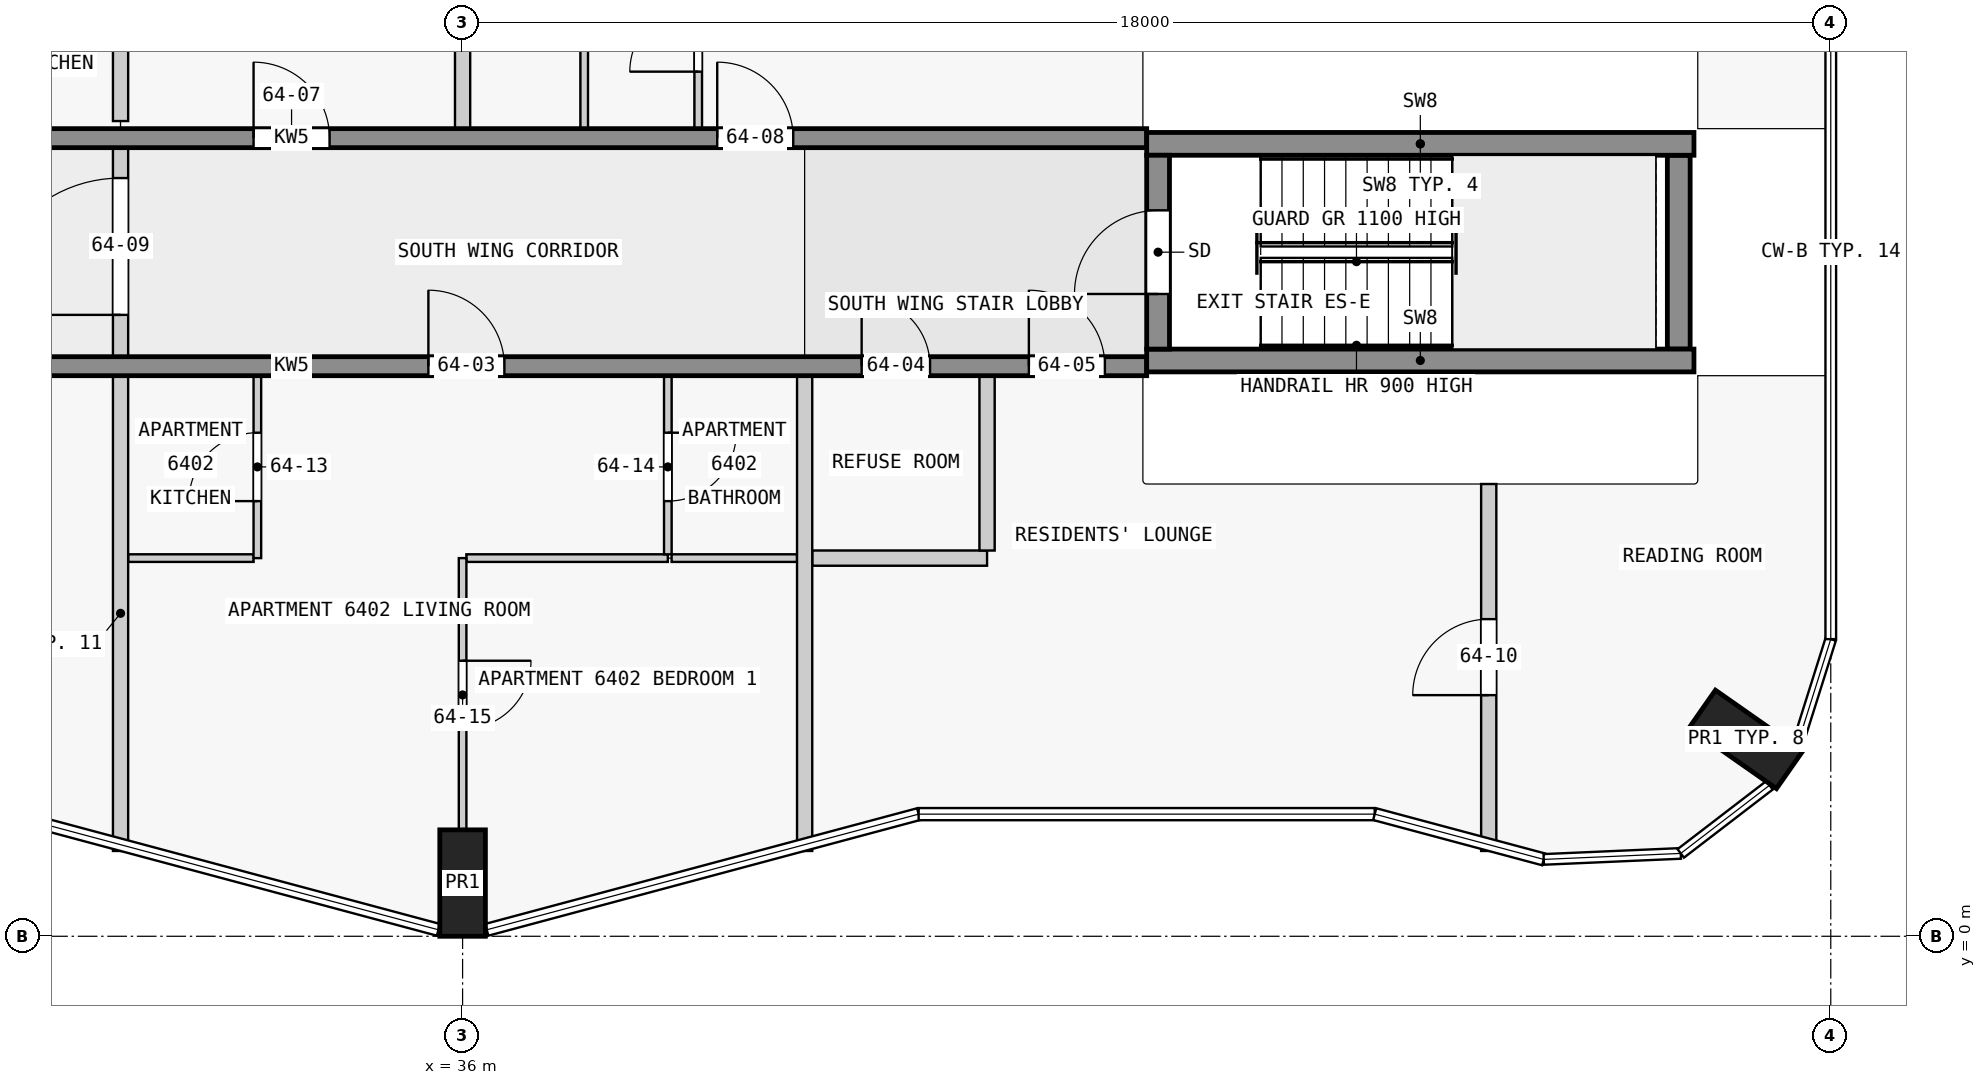
"""IFC4 building model, lengths in metres.
Left out: names, types, materials, properties, quantities, classifications, styles, units other than length and angle.
Written with IfcOpenShell. Run it as: python <this file> out.ifc"""

import sys

from ifc_helpers import new_model, si_unit, direction, frame, frame_2d, origin, origin_2d, place, context, subcontext, project, spatial, rectangle, extrude, element, fill, save


model = new_model("IFC4")
c1 = context("Model", 3, precision=1e-05, world=origin(), true_north=direction((0.0, 1.0)))
c2 = subcontext(c1, "Body", "Model", "MODEL_VIEW")
j1 = project(units=[si_unit("LENGTHUNIT", "METRE"), si_unit("PLANEANGLEUNIT", "RADIAN")], contexts=[c1])
p1 = place(None, origin())
s1 = spatial("IfcSite", under=j1, at=p1, CompositionType="ELEMENT")
p2 = place(p1, origin())
s2 = spatial("IfcBuilding", under=s1, at=p2, CompositionType="ELEMENT")
p3 = place(p2, frame((0.0, 0.0, 245.9)))
s3 = spatial("IfcBuildingStorey", under=s2, at=p3, CompositionType="ELEMENT", Elevation=245.9)
for number, where, z_axis, x_axis in (
    (1, (36.0, 0.7, 0.0), (0.0, 0.0, 1.0), (1.0, 0.0, 0.0)),
    (2, (52.884, 2.59, 0.0), (0.0, 0.0, 1.0), (0.574, 0.819, 0.0)),
):
    element("IfcColumn", number, at=place(p3, frame(where, z_axis=z_axis, x_axis=x_axis)), inside=s3, PredefinedType="COLUMN", context=c2, shape_type="SweptSolid", body=[
        extrude(rectangle(XDim=0.6, YDim=1.4, at=origin_2d()), origin(), (0.0, 0.0, 1.0), 3.5),
    ])
p4 = place(p3, frame((45.15, 7.725, 0.0), z_axis=(0.0, 0.0, 1.0), x_axis=(0.0, 1.0, 0.0)))
e3 = element("IfcWall", 3, at=p4, inside=s3, PredefinedType="SHEAR", context=c2, shape_type="SweptSolid", body=[
    extrude(rectangle(XDim=2.55, YDim=0.3, at=frame_2d((1.275, 0.0))), origin(), (0.0, 0.0, 1.0), 3.5),
])
p5 = place(p4, frame((0.725, 0.0, 0.0)))
e4 = element("IfcOpeningElement", 4, at=p5, cuts=e3, PredefinedType="OPENING", context=c2, shape_type="SweptSolid", body=[
    extrude(rectangle(XDim=1.1, YDim=2.1, at=frame_2d((0.55, 1.05))), frame((0.0, 0.16, 0.0), z_axis=(0.0, -1.0, 0.0), x_axis=(1.0, 0.0, 0.0)), (0.0, 0.0, 1.0), 0.32),
])
p6 = place(p3, frame((52.0, 7.725, 0.0), z_axis=(0.0, 0.0, 1.0), x_axis=(0.0, 1.0, 0.0)))
e5 = element("IfcWall", 5, at=p6, inside=s3, PredefinedType="SHEAR", context=c2, shape_type="SweptSolid", body=[
    extrude(rectangle(XDim=2.55, YDim=0.3, at=frame_2d((1.275, 0.0))), origin(), (0.0, 0.0, 1.0), 3.5),
])
for number, where, z_axis, x_axis in (
    (6, (45.0, 7.575, 0.0), (0.0, 0.0, 1.0), (1.0, 0.0, 0.0)),
    (7, (45.0, 10.425, 0.0), (0.0, 0.0, 1.0), (1.0, 0.0, 0.0)),
):
    element("IfcWall", number, at=place(p3, frame(where, z_axis=z_axis, x_axis=x_axis)), inside=s3, PredefinedType="SHEAR", context=c2, shape_type="SweptSolid", body=[
        extrude(rectangle(XDim=7.2, YDim=0.3, at=frame_2d((3.6, 0.0))), origin(), (0.0, 0.0, 1.0), 3.5),
    ])
p7 = place(p3, frame((22.5, 7.5, 0.0), z_axis=(0.0, 0.0, 1.0), x_axis=(1.0, 0.0, 0.0)))
e8 = element("IfcWall", 8, at=p7, inside=s3, PredefinedType="SHEAR", context=c2, shape_type="SweptSolid", body=[
    extrude(rectangle(XDim=22.5, YDim=0.25, at=frame_2d((11.25, 0.0))), origin(), (0.0, 0.0, 1.0), 3.25),
])
p8 = place(p7, frame((1.75, 0.0, 0.0)))
e9 = element("IfcOpeningElement", 9, at=p8, cuts=e8, PredefinedType="OPENING", context=c2, shape_type="SweptSolid", body=[
    extrude(rectangle(XDim=1.0, YDim=2.1, at=frame_2d((0.5, 1.05))), frame((0.0, 0.135, 0.0), z_axis=(0.0, -1.0, 0.0), x_axis=(1.0, 0.0, 0.0)), (0.0, 0.0, 1.0), 0.27),
])
p9 = place(p7, frame((5.85, 0.0, 0.0)))
e10 = element("IfcOpeningElement", 10, at=p9, cuts=e8, PredefinedType="OPENING", context=c2, shape_type="SweptSolid", body=[
    extrude(rectangle(XDim=1.8, YDim=2.1, at=frame_2d((0.9, 1.05))), frame((0.0, 0.135, 0.0), z_axis=(0.0, -1.0, 0.0), x_axis=(1.0, 0.0, 0.0)), (0.0, 0.0, 1.0), 0.27),
])
p10 = place(p7, frame((13.05, 0.0, 0.0)))
e11 = element("IfcOpeningElement", 11, at=p10, cuts=e8, PredefinedType="OPENING", context=c2, shape_type="SweptSolid", body=[
    extrude(rectangle(XDim=1.0, YDim=2.1, at=frame_2d((0.5, 1.05))), frame((0.0, 0.135, 0.0), z_axis=(0.0, -1.0, 0.0), x_axis=(1.0, 0.0, 0.0)), (0.0, 0.0, 1.0), 0.27),
])
p11 = place(p7, frame((18.75, 0.0, 0.0)))
e12 = element("IfcOpeningElement", 12, at=p11, cuts=e8, PredefinedType="OPENING", context=c2, shape_type="SweptSolid", body=[
    extrude(rectangle(XDim=0.9, YDim=2.1, at=frame_2d((0.45, 1.05))), frame((0.0, 0.135, 0.0), z_axis=(0.0, -1.0, 0.0), x_axis=(1.0, 0.0, 0.0)), (0.0, 0.0, 1.0), 0.27),
])
p12 = place(p7, frame((20.95, 0.0, 0.0)))
e13 = element("IfcOpeningElement", 13, at=p12, cuts=e8, PredefinedType="OPENING", context=c2, shape_type="SweptSolid", body=[
    extrude(rectangle(XDim=1.0, YDim=2.1, at=frame_2d((0.5, 1.05))), frame((0.0, 0.135, 0.0), z_axis=(0.0, -1.0, 0.0), x_axis=(1.0, 0.0, 0.0)), (0.0, 0.0, 1.0), 0.27),
])
p13 = place(p3, frame((22.5, 10.5, 0.0), z_axis=(0.0, 0.0, 1.0), x_axis=(1.0, 0.0, 0.0)))
e14 = element("IfcWall", 14, at=p13, inside=s3, PredefinedType="SHEAR", context=c2, shape_type="SweptSolid", body=[
    extrude(rectangle(XDim=22.5, YDim=0.25, at=frame_2d((11.25, 0.0))), origin(), (0.0, 0.0, 1.0), 3.25),
])
p14 = place(p13, frame((4.05, 0.0, 0.0)))
e15 = element("IfcOpeningElement", 15, at=p14, cuts=e14, PredefinedType="OPENING", context=c2, shape_type="SweptSolid", body=[
    extrude(rectangle(XDim=1.0, YDim=2.1, at=frame_2d((0.5, 1.05))), frame((0.0, 0.135, 0.0), z_axis=(0.0, -1.0, 0.0), x_axis=(1.0, 0.0, 0.0)), (0.0, 0.0, 1.0), 0.27),
])
p15 = place(p13, frame((10.75, 0.0, 0.0)))
e16 = element("IfcOpeningElement", 16, at=p15, cuts=e14, PredefinedType="OPENING", context=c2, shape_type="SweptSolid", body=[
    extrude(rectangle(XDim=1.0, YDim=2.1, at=frame_2d((0.5, 1.05))), frame((0.0, 0.135, 0.0), z_axis=(0.0, -1.0, 0.0), x_axis=(1.0, 0.0, 0.0)), (0.0, 0.0, 1.0), 0.27),
])
p16 = place(p13, frame((16.85, 0.0, 0.0)))
e17 = element("IfcOpeningElement", 17, at=p16, cuts=e14, PredefinedType="OPENING", context=c2, shape_type="SweptSolid", body=[
    extrude(rectangle(XDim=1.0, YDim=2.1, at=frame_2d((0.5, 1.05))), frame((0.0, 0.135, 0.0), z_axis=(0.0, -1.0, 0.0), x_axis=(1.0, 0.0, 0.0)), (0.0, 0.0, 1.0), 0.27),
])
p17 = place(p3, frame((38.7, 4.975, 0.0), z_axis=(0.0, 0.0, 1.0), x_axis=(-1.0, 0.0, 0.0)))
e18 = element("IfcWall", 18, at=p17, inside=s3, PredefinedType="PARTITIONING", context=c2, shape_type="SweptSolid", body=[
    extrude(rectangle(XDim=2.65, YDim=0.1, at=frame_2d((1.325, 0.0))), origin(), (0.0, 0.0, 1.0), 3.25),
])
for number, where, z_axis, x_axis in (
    (19, (31.6, 4.975, 0.0), (0.0, 0.0, 1.0), (1.0, 0.0, 0.0)),
    (20, (38.75, 4.975, 0.0), (0.0, 0.0, 1.0), (1.0, 0.0, 0.0)),
):
    element("IfcWall", number, at=place(p3, frame(where, z_axis=z_axis, x_axis=x_axis)), inside=s3, PredefinedType="PARTITIONING", context=c2, shape_type="SweptSolid", body=[
        extrude(rectangle(XDim=1.65, YDim=0.1, at=frame_2d((0.825, 0.0))), origin(), (0.0, 0.0, 1.0), 3.25),
    ])
p18 = place(p3, frame((40.6, 4.975, 0.0), z_axis=(0.0, 0.0, 1.0), x_axis=(1.0, 0.0, 0.0)))
e21 = element("IfcWall", 21, at=p18, inside=s3, PredefinedType="PARTITIONING", context=c2, shape_type="SweptSolid", body=[
    extrude(rectangle(XDim=2.3, YDim=0.2, at=frame_2d((1.15, 0.0))), origin(), (0.0, 0.0, 1.0), 3.25),
])
p19 = place(p3, frame((31.5, 1.122, 0.0), z_axis=(0.0, 0.0, 1.0), x_axis=(0.0, 1.0, 0.0)))
e22 = element("IfcWall", 22, at=p19, inside=s3, PredefinedType="PARTITIONING", context=c2, shape_type="SweptSolid", body=[
    extrude(rectangle(XDim=6.253, YDim=0.2, at=frame_2d((3.126, 0.0))), origin(), (0.0, 0.0, 1.0), 3.25),
])
p20 = place(p3, frame((31.5, 10.725, 0.0), z_axis=(0.0, 0.0, 1.0), x_axis=(0.0, 1.0, 0.0)))
e23 = element("IfcWall", 23, at=p20, inside=s3, PredefinedType="PARTITIONING", context=c2, shape_type="SweptSolid", body=[
    extrude(rectangle(XDim=2.2, YDim=0.2, at=frame_2d((1.1, 0.0))), origin(), (0.0, 0.0, 1.0), 3.25),
])
p21 = place(p3, frame((33.3, 4.975, 0.0), z_axis=(0.0, 0.0, 1.0), x_axis=(0.0, 1.0, 0.0)))
e24 = element("IfcWall", 24, at=p21, inside=s3, PredefinedType="PARTITIONING", context=c2, shape_type="SweptSolid", body=[
    extrude(rectangle(XDim=2.4, YDim=0.1, at=frame_2d((1.2, 0.0))), origin(), (0.0, 0.0, 1.0), 3.25),
])
p22 = place(p21, frame((0.75, 0.0, 0.0)))
e25 = element("IfcOpeningElement", 25, at=p22, cuts=e24, PredefinedType="OPENING", context=c2, shape_type="SweptSolid", body=[
    extrude(rectangle(XDim=0.9, YDim=2.1, at=frame_2d((0.45, 1.05))), frame((0.0, 0.06, 0.0), z_axis=(0.0, -1.0, 0.0), x_axis=(1.0, 0.0, 0.0)), (0.0, 0.0, 1.0), 0.12),
])
p23 = place(p3, frame((36.0, 4.975, 0.0), z_axis=(0.0, 0.0, 1.0), x_axis=(0.0, -1.0, 0.0)))
e26 = element("IfcWall", 26, at=p23, inside=s3, PredefinedType="PARTITIONING", context=c2, shape_type="SweptSolid", body=[
    extrude(rectangle(XDim=3.575, YDim=0.1, at=frame_2d((1.788, 0.0))), origin(), (0.0, 0.0, 1.0), 3.25),
])
p24 = place(p23, frame((1.35, 0.0, 0.0)))
e27 = element("IfcOpeningElement", 27, at=p24, cuts=e26, PredefinedType="OPENING", context=c2, shape_type="SweptSolid", body=[
    extrude(rectangle(XDim=0.9, YDim=2.1, at=frame_2d((0.45, 1.05))), frame((0.0, 0.06, 0.0), z_axis=(0.0, -1.0, 0.0), x_axis=(1.0, 0.0, 0.0)), (0.0, 0.0, 1.0), 0.12),
])
p25 = place(p3, frame((36.0, 10.625, 0.0), z_axis=(0.0, 0.0, 1.0), x_axis=(0.0, 1.0, 0.0)))
e28 = element("IfcWall", 28, at=p25, inside=s3, PredefinedType="PARTITIONING", context=c2, shape_type="SweptSolid", body=[
    extrude(rectangle(XDim=5.975, YDim=0.2, at=frame_2d((2.988, 0.0))), origin(), (0.0, 0.0, 1.0), 3.25),
])
p26 = place(p3, frame((37.6, 10.625, 0.0), z_axis=(0.0, 0.0, 1.0), x_axis=(0.0, 1.0, 0.0)))
e29 = element("IfcWall", 29, at=p26, inside=s3, PredefinedType="PARTITIONING", context=c2, shape_type="SweptSolid", body=[
    extrude(rectangle(XDim=2.35, YDim=0.1, at=frame_2d((1.175, 0.0))), origin(), (0.0, 0.0, 1.0), 3.25),
])
p27 = place(p3, frame((38.7, 7.375, 0.0), z_axis=(0.0, 0.0, 1.0), x_axis=(0.0, -1.0, 0.0)))
e30 = element("IfcWall", 30, at=p27, inside=s3, PredefinedType="PARTITIONING", context=c2, shape_type="SweptSolid", body=[
    extrude(rectangle(XDim=2.35, YDim=0.1, at=frame_2d((1.175, 0.0))), origin(), (0.0, 0.0, 1.0), 3.25),
])
p28 = place(p27, frame((0.75, 0.0, 0.0)))
e31 = element("IfcOpeningElement", 31, at=p28, cuts=e30, PredefinedType="OPENING", context=c2, shape_type="SweptSolid", body=[
    extrude(rectangle(XDim=0.9, YDim=2.1, at=frame_2d((0.45, 1.05))), frame((0.0, 0.06, 0.0), z_axis=(0.0, -1.0, 0.0), x_axis=(1.0, 0.0, 0.0)), (0.0, 0.0, 1.0), 0.12),
])
p29 = place(p3, frame((39.1, 10.625, 0.0), z_axis=(0.0, 0.0, 1.0), x_axis=(0.0, 1.0, 0.0)))
e32 = element("IfcWall", 32, at=p29, inside=s3, PredefinedType="PARTITIONING", context=c2, shape_type="SweptSolid", body=[
    extrude(rectangle(XDim=2.35, YDim=0.1, at=frame_2d((1.175, 0.0))), origin(), (0.0, 0.0, 1.0), 3.25),
])
p30 = place(p29, frame((0.75, 0.0, 0.0)))
e33 = element("IfcOpeningElement", 33, at=p30, cuts=e32, PredefinedType="OPENING", context=c2, shape_type="SweptSolid", body=[
    extrude(rectangle(XDim=0.9, YDim=2.1, at=frame_2d((0.45, 1.05))), frame((0.0, 0.06, 0.0), z_axis=(0.0, -1.0, 0.0), x_axis=(1.0, 0.0, 0.0)), (0.0, 0.0, 1.0), 0.12),
])
p31 = place(p3, frame((40.5, 1.122, 0.0), z_axis=(0.0, 0.0, 1.0), x_axis=(0.0, 1.0, 0.0)))
e34 = element("IfcWall", 34, at=p31, inside=s3, PredefinedType="PARTITIONING", context=c2, shape_type="SweptSolid", body=[
    extrude(rectangle(XDim=6.253, YDim=0.2, at=frame_2d((3.126, 0.0))), origin(), (0.0, 0.0, 1.0), 3.25),
])
p32 = place(p3, frame((42.9, 5.075, 0.0), z_axis=(0.0, 0.0, 1.0), x_axis=(0.0, 1.0, 0.0)))
e35 = element("IfcWall", 35, at=p32, inside=s3, PredefinedType="PARTITIONING", context=c2, shape_type="SweptSolid", body=[
    extrude(rectangle(XDim=2.3, YDim=0.2, at=frame_2d((1.15, 0.0))), origin(), (0.0, 0.0, 1.0), 3.25),
])
p33 = place(p3, frame((49.5, 1.122, 0.0), z_axis=(0.0, 0.0, 1.0), x_axis=(0.0, 1.0, 0.0)))
e36 = element("IfcWall", 36, at=p33, inside=s3, PredefinedType="PARTITIONING", context=c2, shape_type="SweptSolid", body=[
    extrude(rectangle(XDim=4.828, YDim=0.2, at=frame_2d((2.414, 0.0))), origin(), (0.0, 0.0, 1.0), 3.25),
])
p34 = place(p33, frame((2.05, 0.0, 0.0)))
e37 = element("IfcOpeningElement", 37, at=p34, cuts=e36, PredefinedType="OPENING", context=c2, shape_type="SweptSolid", body=[
    extrude(rectangle(XDim=1.0, YDim=2.1, at=frame_2d((0.5, 1.05))), frame((0.0, 0.11, 0.0), z_axis=(0.0, -1.0, 0.0), x_axis=(1.0, 0.0, 0.0)), (0.0, 0.0, 1.0), 0.22),
])
p35 = place(p3, frame((31.5, 7.475, 0.0), z_axis=(0.0, 0.0, 1.0), x_axis=(0.0, 1.0, 0.0)))
e38 = element("IfcWall", 38, at=p35, inside=s3, PredefinedType="PARTITIONING", context=c2, shape_type="SweptSolid", body=[
    extrude(rectangle(XDim=3.15, YDim=0.2, at=frame_2d((1.575, 0.0))), origin(), (0.0, 0.0, 1.0), 3.25),
])
p36 = place(p35, frame((0.7, 0.0, 0.0)))
e39 = element("IfcOpeningElement", 39, at=p36, cuts=e38, PredefinedType="OPENING", context=c2, shape_type="SweptSolid", body=[
    extrude(rectangle(XDim=1.8, YDim=2.1, at=frame_2d((0.9, 1.05))), frame((0.0, 0.11, 0.0), z_axis=(0.0, -1.0, 0.0), x_axis=(1.0, 0.0, 0.0)), (0.0, 0.0, 1.0), 0.22),
])
p37 = place(p5, origin())
e40 = element("IfcDoor", 40, at=p37, inside=s3, OperationType="SINGLE_SWING_LEFT", PredefinedType="DOOR", context=c2, shape_type="SweptSolid", body=[
    extrude(rectangle(XDim=1.1, YDim=2.1, at=frame_2d((0.55, 1.05))), frame((0.0, 0.025, 0.0), z_axis=(0.0, -1.0, 0.0), x_axis=(1.0, 0.0, 0.0)), (0.0, 0.0, 1.0), 0.05),
])
fill(e4, e40)
p38 = place(p10, origin())
e41 = element("IfcDoor", 41, at=p38, inside=s3, OperationType="SINGLE_SWING_RIGHT", PredefinedType="DOOR", context=c2, shape_type="SweptSolid", body=[
    extrude(rectangle(XDim=1.0, YDim=2.1, at=frame_2d((0.5, 1.05))), frame((0.0, 0.025, 0.0), z_axis=(0.0, -1.0, 0.0), x_axis=(1.0, 0.0, 0.0)), (0.0, 0.0, 1.0), 0.05),
])
fill(e11, e41)
p39 = place(p11, origin())
e42 = element("IfcDoor", 42, at=p39, inside=s3, OperationType="SINGLE_SWING_RIGHT", PredefinedType="DOOR", context=c2, shape_type="SweptSolid", body=[
    extrude(rectangle(XDim=0.9, YDim=2.1, at=frame_2d((0.45, 1.05))), frame((0.0, 0.025, 0.0), z_axis=(0.0, -1.0, 0.0), x_axis=(1.0, 0.0, 0.0)), (0.0, 0.0, 1.0), 0.05),
])
fill(e12, e42)
p40 = place(p12, origin())
e43 = element("IfcDoor", 43, at=p40, inside=s3, OperationType="SINGLE_SWING_RIGHT", PredefinedType="DOOR", context=c2, shape_type="SweptSolid", body=[
    extrude(rectangle(XDim=1.0, YDim=2.1, at=frame_2d((0.5, 1.05))), frame((0.0, 0.025, 0.0), z_axis=(0.0, -1.0, 0.0), x_axis=(1.0, 0.0, 0.0)), (0.0, 0.0, 1.0), 0.05),
])
fill(e13, e43)
p41 = place(p15, origin())
e44 = element("IfcDoor", 44, at=p41, inside=s3, OperationType="SINGLE_SWING_LEFT", PredefinedType="DOOR", context=c2, shape_type="SweptSolid", body=[
    extrude(rectangle(XDim=1.0, YDim=2.1, at=frame_2d((0.5, 1.05))), frame((0.0, 0.025, 0.0), z_axis=(0.0, -1.0, 0.0), x_axis=(1.0, 0.0, 0.0)), (0.0, 0.0, 1.0), 0.05),
])
fill(e16, e44)
p42 = place(p16, origin())
e45 = element("IfcDoor", 45, at=p42, inside=s3, OperationType="SINGLE_SWING_RIGHT", PredefinedType="DOOR", context=c2, shape_type="SweptSolid", body=[
    extrude(rectangle(XDim=1.0, YDim=2.1, at=frame_2d((0.5, 1.05))), frame((0.0, 0.025, 0.0), z_axis=(0.0, -1.0, 0.0), x_axis=(1.0, 0.0, 0.0)), (0.0, 0.0, 1.0), 0.05),
])
fill(e17, e45)
p43 = place(p36, origin())
e46 = element("IfcDoor", 46, at=p43, inside=s3, OperationType="SINGLE_SWING_RIGHT", PredefinedType="DOOR", context=c2, shape_type="SweptSolid", body=[
    extrude(rectangle(XDim=1.8, YDim=2.1, at=frame_2d((0.9, 1.05))), frame((0.0, 0.025, 0.0), z_axis=(0.0, -1.0, 0.0), x_axis=(1.0, 0.0, 0.0)), (0.0, 0.0, 1.0), 0.05),
])
fill(e39, e46)
p44 = place(p34, origin())
e47 = element("IfcDoor", 47, at=p44, inside=s3, OperationType="SINGLE_SWING_RIGHT", PredefinedType="DOOR", context=c2, shape_type="SweptSolid", body=[
    extrude(rectangle(XDim=1.0, YDim=2.1, at=frame_2d((0.5, 1.05))), frame((0.0, 0.025, 0.0), z_axis=(0.0, -1.0, 0.0), x_axis=(1.0, 0.0, 0.0)), (0.0, 0.0, 1.0), 0.05),
])
fill(e37, e47)
p45 = place(p22, origin())
e48 = element("IfcDoor", 48, at=p45, inside=s3, OperationType="SINGLE_SWING_LEFT", PredefinedType="DOOR", context=c2, shape_type="SweptSolid", body=[
    extrude(rectangle(XDim=0.9, YDim=2.1, at=frame_2d((0.45, 1.05))), frame((0.0, 0.025, 0.0), z_axis=(0.0, -1.0, 0.0), x_axis=(1.0, 0.0, 0.0)), (0.0, 0.0, 1.0), 0.05),
])
fill(e25, e48)
p46 = place(p28, origin())
e49 = element("IfcDoor", 49, at=p46, inside=s3, OperationType="SINGLE_SWING_RIGHT", PredefinedType="DOOR", context=c2, shape_type="SweptSolid", body=[
    extrude(rectangle(XDim=0.9, YDim=2.1, at=frame_2d((0.45, 1.05))), frame((0.0, 0.025, 0.0), z_axis=(0.0, -1.0, 0.0), x_axis=(1.0, 0.0, 0.0)), (0.0, 0.0, 1.0), 0.05),
])
fill(e31, e49)
p47 = place(p24, origin())
e50 = element("IfcDoor", 50, at=p47, inside=s3, OperationType="SINGLE_SWING_RIGHT", PredefinedType="DOOR", context=c2, shape_type="SweptSolid", body=[
    extrude(rectangle(XDim=0.9, YDim=2.1, at=frame_2d((0.45, 1.05))), frame((0.0, 0.025, 0.0), z_axis=(0.0, -1.0, 0.0), x_axis=(1.0, 0.0, 0.0)), (0.0, 0.0, 1.0), 0.05),
])
fill(e27, e50)
p48 = place(p30, origin())
e51 = element("IfcDoor", 51, at=p48, inside=s3, OperationType="SINGLE_SWING_RIGHT", PredefinedType="DOOR", context=c2, shape_type="SweptSolid", body=[
    extrude(rectangle(XDim=0.9, YDim=2.1, at=frame_2d((0.45, 1.05))), frame((0.0, 0.025, 0.0), z_axis=(0.0, -1.0, 0.0), x_axis=(1.0, 0.0, 0.0)), (0.0, 0.0, 1.0), 0.05),
])
fill(e33, e51)
save(model, sys.argv[1])
